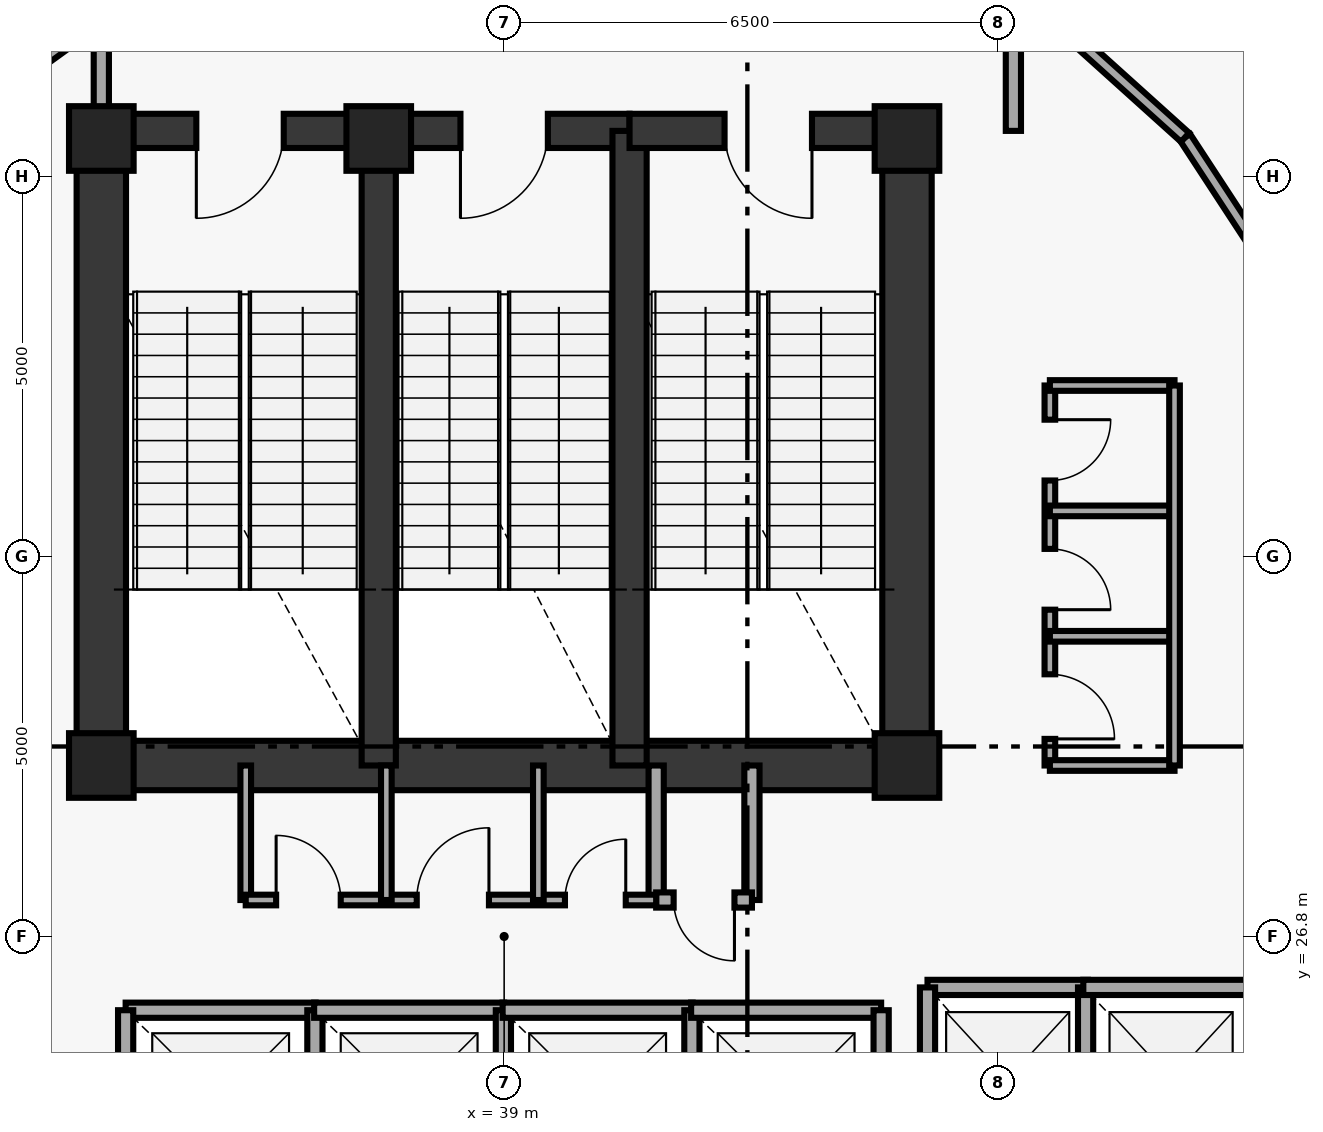
"""IFC4 building model, lengths in metres.
Left out: names, types, materials, properties, quantities, classifications, styles, units other than length and angle.
Written with IfcOpenShell. Run it as: python <this file> out.ifc"""

import sys

from ifc_helpers import new_model, si_unit, direction, frame, frame_2d, origin, origin_2d, place, context, subcontext, project, spatial, rectangle, extrude, element, fill, save


model = new_model("IFC4")
c1 = context("Model", 3, precision=1e-05, world=origin(), true_north=direction((0.0, 1.0)))
c2 = subcontext(c1, "Body", "Model", "MODEL_VIEW")
j1 = project(units=[si_unit("LENGTHUNIT", "METRE"), si_unit("PLANEANGLEUNIT", "RADIAN")], contexts=[c1])
p1 = place(None, origin())
s1 = spatial("IfcSite", under=j1, at=p1, CompositionType="ELEMENT")
p2 = place(p1, origin())
s2 = spatial("IfcBuilding", under=s1, at=p2, CompositionType="ELEMENT")
p3 = place(p2, frame((0.0, 0.0, 203.15)))
s3 = spatial("IfcBuildingStorey", under=s2, at=p3, CompositionType="ELEMENT", Elevation=203.15)
for number, where, z_axis, x_axis in (
    (1, (44.3, 29.05, 0.0), (0.0, 0.0, 1.0), (1.0, 0.0, 0.0)),
    (2, (44.3, 37.3, 0.0), (0.0, 0.0, 1.0), (1.0, 0.0, 0.0)),
    (3, (37.35, 37.3, 0.0), (0.0, 0.0, 1.0), (1.0, 0.0, 0.0)),
    (4, (33.7, 37.3, 0.0), (0.0, 0.0, 1.0), (1.0, 0.0, 0.0)),
    (5, (33.7, 29.05, 0.0), (0.0, 0.0, 1.0), (1.0, 0.0, 0.0)),
):
    element("IfcColumn", number, at=place(p3, frame(where, z_axis=z_axis, x_axis=x_axis)), inside=s3, PredefinedType="PILASTER", context=c2, shape_type="SweptSolid", body=[
        extrude(rectangle(XDim=0.85, YDim=0.85, at=origin_2d()), origin(), (0.0, 0.0, 1.0), 4.76),
    ])
for number, where, z_axis, x_axis in (
    (6, (33.7, 29.05, 0.0), (0.0, 0.0, 1.0), (0.0, 1.0, 0.0)),
    (7, (44.3, 29.05, 0.0), (0.0, 0.0, 1.0), (0.0, 1.0, 0.0)),
):
    element("IfcWall", number, at=place(p3, frame(where, z_axis=z_axis, x_axis=x_axis)), inside=s3, PredefinedType="SHEAR", context=c2, shape_type="SweptSolid", body=[
        extrude(rectangle(XDim=8.35, YDim=0.65, at=frame_2d((4.175, 0.0))), origin(), (0.0, 0.0, 1.0), 4.76),
    ])
p4 = place(p3, frame((33.7, 29.05, 0.0), z_axis=(0.0, 0.0, 1.0), x_axis=(1.0, 0.0, 0.0)))
e8 = element("IfcWall", 8, at=p4, inside=s3, PredefinedType="SHEAR", context=c2, shape_type="SweptSolid", body=[
    extrude(rectangle(XDim=10.6, YDim=0.65, at=frame_2d((5.3, 0.0))), origin(), (0.0, 0.0, 1.0), 4.76),
])
p5 = place(p3, frame((37.35, 37.4, 0.0), z_axis=(0.0, 0.0, 1.0), x_axis=(-1.0, 0.0, 0.0)))
e9 = element("IfcWall", 9, at=p5, inside=s3, PredefinedType="SHEAR", context=c2, shape_type="SweptSolid", body=[
    extrude(rectangle(XDim=3.65, YDim=0.45, at=frame_2d((1.825, 0.0))), origin(), (0.0, 0.0, 1.0), 4.76),
])
p6 = place(p5, frame((1.25, 0.0, 0.0)))
e10 = element("IfcOpeningElement", 10, at=p6, cuts=e9, PredefinedType="OPENING", context=c2, shape_type="SweptSolid", body=[
    extrude(rectangle(XDim=1.15, YDim=2.15, at=frame_2d((0.575, 1.075))), frame((0.0, 0.235, 0.0), z_axis=(0.0, -1.0, 0.0), x_axis=(1.0, 0.0, 0.0)), (0.0, 0.0, 1.0), 0.47),
])
p7 = place(p3, frame((37.35, 29.05, 0.0), z_axis=(0.0, 0.0, 1.0), x_axis=(0.0, 1.0, 0.0)))
e11 = element("IfcWall", 11, at=p7, inside=s3, PredefinedType="SHEAR", context=c2, shape_type="SweptSolid", body=[
    extrude(rectangle(XDim=8.35, YDim=0.45, at=frame_2d((4.175, 0.0))), origin(), (0.0, 0.0, 1.0), 4.76),
])
p8 = place(p3, frame((40.65, 37.4, 0.0), z_axis=(0.0, 0.0, 1.0), x_axis=(-1.0, 0.0, 0.0)))
e12 = element("IfcWall", 12, at=p8, inside=s3, PredefinedType="SHEAR", context=c2, shape_type="SweptSolid", body=[
    extrude(rectangle(XDim=3.3, YDim=0.45, at=frame_2d((1.65, 0.0))), origin(), (0.0, 0.0, 1.0), 4.76),
])
p9 = place(p8, frame((1.075, 0.0, 0.0)))
e13 = element("IfcOpeningElement", 13, at=p9, cuts=e12, PredefinedType="OPENING", context=c2, shape_type="SweptSolid", body=[
    extrude(rectangle(XDim=1.15, YDim=2.15, at=frame_2d((0.575, 1.075))), frame((0.0, 0.235, 0.0), z_axis=(0.0, -1.0, 0.0), x_axis=(1.0, 0.0, 0.0)), (0.0, 0.0, 1.0), 0.47),
])
p10 = place(p3, frame((40.65, 29.05, 0.0), z_axis=(0.0, 0.0, 1.0), x_axis=(0.0, 1.0, 0.0)))
e14 = element("IfcWall", 14, at=p10, inside=s3, PredefinedType="SHEAR", context=c2, shape_type="SweptSolid", body=[
    extrude(rectangle(XDim=8.35, YDim=0.45, at=frame_2d((4.175, 0.0))), origin(), (0.0, 0.0, 1.0), 4.76),
])
p11 = place(p3, frame((44.3, 37.4, 0.0), z_axis=(0.0, 0.0, 1.0), x_axis=(-1.0, 0.0, 0.0)))
e15 = element("IfcWall", 15, at=p11, inside=s3, PredefinedType="SHEAR", context=c2, shape_type="SweptSolid", body=[
    extrude(rectangle(XDim=3.65, YDim=0.45, at=frame_2d((1.825, 0.0))), origin(), (0.0, 0.0, 1.0), 4.76),
])
p12 = place(p11, frame((1.25, 0.0, 0.0)))
e16 = element("IfcOpeningElement", 16, at=p12, cuts=e15, PredefinedType="OPENING", context=c2, shape_type="SweptSolid", body=[
    extrude(rectangle(XDim=1.15, YDim=2.15, at=frame_2d((0.575, 1.075))), frame((0.0, 0.235, 0.0), z_axis=(0.0, -1.0, 0.0), x_axis=(1.0, 0.0, 0.0)), (0.0, 0.0, 1.0), 0.47),
])
for number, where, z_axis, x_axis in (
    (17, (33.7, 37.4, 0.0), (0.0, 0.0, 1.0), (0.0, 1.0, 0.0)),
    (18, (45.7, 37.4, 0.0), (0.0, 0.0, 1.0), (0.0, 1.0, 0.0)),
):
    element("IfcWall", number, at=place(p3, frame(where, z_axis=z_axis, x_axis=x_axis)), inside=s3, PredefinedType="SOLIDWALL", context=c2, shape_type="SweptSolid", body=[
        extrude(rectangle(XDim=1.88, YDim=0.2, at=frame_2d((0.94, 0.0))), origin(), (0.0, 0.0, 1.0), 4.76),
    ])
p13 = place(p3, frame((35.6, 27.28, 0.0), z_axis=(0.0, 0.0, 1.0), x_axis=(0.0, 1.0, 0.0)))
e19 = element("IfcWall", 19, at=p13, inside=s3, PredefinedType="PARTITIONING", context=c2, shape_type="SweptSolid", body=[
    extrude(rectangle(XDim=1.77, YDim=0.14, at=frame_2d((0.885, 0.0))), origin(), (0.0, 0.0, 1.0), 4.76),
])
for number, where, z_axis, x_axis in (
    (20, (41.0, 27.28, 0.0), (0.0, 0.0, 1.0), (0.0, 1.0, 0.0)),
    (21, (42.26, 27.28, 0.0), (0.0, 0.0, 1.0), (0.0, 1.0, 0.0)),
):
    element("IfcWall", number, at=place(p3, frame(where, z_axis=z_axis, x_axis=x_axis)), inside=s3, PredefinedType="SOLIDWALL", context=c2, shape_type="SweptSolid", body=[
        extrude(rectangle(XDim=1.77, YDim=0.2, at=frame_2d((0.885, 0.0))), origin(), (0.0, 0.0, 1.0), 4.76),
    ])
p14 = place(p3, frame((41.0, 27.28, 0.0), z_axis=(0.0, 0.0, 1.0), x_axis=(1.0, 0.0, 0.0)))
e22 = element("IfcWall", 22, at=p14, inside=s3, PredefinedType="SOLIDWALL", context=c2, shape_type="SweptSolid", body=[
    extrude(rectangle(XDim=1.26, YDim=0.2, at=frame_2d((0.63, 0.0))), origin(), (0.0, 0.0, 1.0), 4.76),
])
p15 = place(p14, frame((0.23, 0.0, 0.0)))
e23 = element("IfcOpeningElement", 23, at=p15, cuts=e22, PredefinedType="OPENING", context=c2, shape_type="SweptSolid", body=[
    extrude(rectangle(XDim=0.8, YDim=2.05, at=frame_2d((0.4, 1.025))), frame((0.0, 0.11, 0.0), z_axis=(0.0, -1.0, 0.0), x_axis=(1.0, 0.0, 0.0)), (0.0, 0.0, 1.0), 0.22),
])
p16 = place(p3, frame((44.57, 26.13, 0.0), z_axis=(0.0, 0.0, 1.0), x_axis=(1.0, 0.0, 0.0)))
e24 = element("IfcWall", 24, at=p16, inside=s3, PredefinedType="SOLIDWALL", context=c2, shape_type="SweptSolid", body=[
    extrude(rectangle(XDim=2.11, YDim=0.2, at=frame_2d((1.055, 0.0))), origin(), (0.0, 0.0, 1.0), 4.76),
])
for number, where, z_axis, x_axis in (
    (25, (44.57, 23.72, 0.0), (0.0, 0.0, 1.0), (0.0, 1.0, 0.0)),
    (26, (46.65, 23.72, 0.0), (0.0, 0.0, 1.0), (0.0, 1.0, 0.0)),
):
    element("IfcWall", number, at=place(p3, frame(where, z_axis=z_axis, x_axis=x_axis)), inside=s3, PredefinedType="SOLIDWALL", context=c2, shape_type="SweptSolid", body=[
        extrude(rectangle(XDim=2.41, YDim=0.2, at=frame_2d((1.205, 0.0))), origin(), (0.0, 0.0, 1.0), 4.76),
    ])
p17 = place(p3, frame((46.62, 26.13, 0.0), z_axis=(0.0, 0.0, 1.0), x_axis=(1.0, 0.0, 0.0)))
e27 = element("IfcWall", 27, at=p17, inside=s3, PredefinedType="SOLIDWALL", context=c2, shape_type="SweptSolid", body=[
    extrude(rectangle(XDim=2.31, YDim=0.2, at=frame_2d((1.155, 0.0))), origin(), (0.0, 0.0, 1.0), 4.76),
])
p18 = place(p3, frame((34.02, 25.83, 0.0), z_axis=(0.0, 0.0, 1.0), x_axis=(1.0, 0.0, 0.0)))
e28 = element("IfcWall", 28, at=p18, inside=s3, PredefinedType="SOLIDWALL", context=c2, shape_type="SweptSolid", body=[
    extrude(rectangle(XDim=2.5, YDim=0.2, at=frame_2d((1.25, 0.0))), origin(), (0.0, 0.0, 1.0), 4.76),
])
for number, where, z_axis, x_axis in (
    (29, (34.02, 23.42, 0.0), (0.0, 0.0, 1.0), (0.0, 1.0, 0.0)),
    (30, (36.51, 23.42, 0.0), (0.0, 0.0, 1.0), (0.0, 1.0, 0.0)),
):
    element("IfcWall", number, at=place(p3, frame(where, z_axis=z_axis, x_axis=x_axis)), inside=s3, PredefinedType="SOLIDWALL", context=c2, shape_type="SweptSolid", body=[
        extrude(rectangle(XDim=2.41, YDim=0.2, at=frame_2d((1.205, 0.0))), origin(), (0.0, 0.0, 1.0), 4.76),
    ])
p19 = place(p3, frame((36.5, 25.83, 0.0), z_axis=(0.0, 0.0, 1.0), x_axis=(1.0, 0.0, 0.0)))
e31 = element("IfcWall", 31, at=p19, inside=s3, PredefinedType="SOLIDWALL", context=c2, shape_type="SweptSolid", body=[
    extrude(rectangle(XDim=2.5, YDim=0.2, at=frame_2d((1.25, 0.0))), origin(), (0.0, 0.0, 1.0), 4.76),
])
p20 = place(p3, frame((38.99, 23.42, 0.0), z_axis=(0.0, 0.0, 1.0), x_axis=(0.0, 1.0, 0.0)))
e32 = element("IfcWall", 32, at=p20, inside=s3, PredefinedType="SOLIDWALL", context=c2, shape_type="SweptSolid", body=[
    extrude(rectangle(XDim=2.41, YDim=0.2, at=frame_2d((1.205, 0.0))), origin(), (0.0, 0.0, 1.0), 4.76),
])
p21 = place(p3, frame((38.98, 25.83, 0.0), z_axis=(0.0, 0.0, 1.0), x_axis=(1.0, 0.0, 0.0)))
e33 = element("IfcWall", 33, at=p21, inside=s3, PredefinedType="SOLIDWALL", context=c2, shape_type="SweptSolid", body=[
    extrude(rectangle(XDim=2.5, YDim=0.2, at=frame_2d((1.25, 0.0))), origin(), (0.0, 0.0, 1.0), 4.76),
])
p22 = place(p3, frame((41.47, 23.42, 0.0), z_axis=(0.0, 0.0, 1.0), x_axis=(0.0, 1.0, 0.0)))
e34 = element("IfcWall", 34, at=p22, inside=s3, PredefinedType="SOLIDWALL", context=c2, shape_type="SweptSolid", body=[
    extrude(rectangle(XDim=2.41, YDim=0.2, at=frame_2d((1.205, 0.0))), origin(), (0.0, 0.0, 1.0), 4.76),
])
p23 = place(p3, frame((41.46, 25.83, 0.0), z_axis=(0.0, 0.0, 1.0), x_axis=(1.0, 0.0, 0.0)))
e35 = element("IfcWall", 35, at=p23, inside=s3, PredefinedType="SOLIDWALL", context=c2, shape_type="SweptSolid", body=[
    extrude(rectangle(XDim=2.5, YDim=0.2, at=frame_2d((1.25, 0.0))), origin(), (0.0, 0.0, 1.0), 4.76),
])
p24 = place(p3, frame((43.96, 23.42, 0.0), z_axis=(0.0, 0.0, 1.0), x_axis=(0.0, 1.0, 0.0)))
e36 = element("IfcWall", 36, at=p24, inside=s3, PredefinedType="SOLIDWALL", context=c2, shape_type="SweptSolid", body=[
    extrude(rectangle(XDim=2.41, YDim=0.2, at=frame_2d((1.205, 0.0))), origin(), (0.0, 0.0, 1.0), 4.76),
])
p25 = place(p3, frame((35.6, 27.28, 0.0), z_axis=(0.0, 0.0, 1.0), x_axis=(1.0, 0.0, 0.0)))
e37 = element("IfcWall", 37, at=p25, inside=s3, PredefinedType="PARTITIONING", context=c2, shape_type="SweptSolid", body=[
    extrude(rectangle(XDim=5.4, YDim=0.14, at=frame_2d((2.7, 0.0))), origin(), (0.0, 0.0, 1.0), 4.76),
])
p26 = place(p25, frame((0.4, 0.0, 0.0)))
e38 = element("IfcOpeningElement", 38, at=p26, cuts=e37, PredefinedType="OPENING", context=c2, shape_type="SweptSolid", body=[
    extrude(rectangle(XDim=0.85, YDim=2.1, at=frame_2d((0.425, 1.05))), frame((0.0, 0.08, 0.0), z_axis=(0.0, -1.0, 0.0), x_axis=(1.0, 0.0, 0.0)), (0.0, 0.0, 1.0), 0.16),
])
p27 = place(p25, frame((2.25, 0.0, 0.0)))
e39 = element("IfcOpeningElement", 39, at=p27, cuts=e37, PredefinedType="OPENING", context=c2, shape_type="SweptSolid", body=[
    extrude(rectangle(XDim=0.95, YDim=2.1, at=frame_2d((0.475, 1.05))), frame((0.0, 0.08, 0.0), z_axis=(0.0, -1.0, 0.0), x_axis=(1.0, 0.0, 0.0)), (0.0, 0.0, 1.0), 0.16),
])
p28 = place(p25, frame((4.2, 0.0, 0.0)))
e40 = element("IfcOpeningElement", 40, at=p28, cuts=e37, PredefinedType="OPENING", context=c2, shape_type="SweptSolid", body=[
    extrude(rectangle(XDim=0.8, YDim=2.05, at=frame_2d((0.4, 1.025))), frame((0.0, 0.08, 0.0), z_axis=(0.0, -1.0, 0.0), x_axis=(1.0, 0.0, 0.0)), (0.0, 0.0, 1.0), 0.16),
])
for number, where, z_axis, x_axis in (
    (41, (37.45, 27.28, 0.0), (0.0, 0.0, 1.0), (0.0, 1.0, 0.0)),
    (42, (39.45, 27.28, 0.0), (0.0, 0.0, 1.0), (0.0, 1.0, 0.0)),
):
    element("IfcWall", number, at=place(p3, frame(where, z_axis=z_axis, x_axis=x_axis)), inside=s3, PredefinedType="PARTITIONING", context=c2, shape_type="SweptSolid", body=[
        extrude(rectangle(XDim=1.77, YDim=0.14, at=frame_2d((0.885, 0.0))), origin(), (0.0, 0.0, 1.0), 4.76),
    ])
p29 = place(p3, frame((46.18, 34.05, 0.0), z_axis=(0.0, 0.0, 1.0), x_axis=(0.0, -1.0, 0.0)))
e43 = element("IfcWall", 43, at=p29, inside=s3, PredefinedType="PARTITIONING", context=c2, shape_type="SweptSolid", body=[
    extrude(rectangle(XDim=5.0, YDim=0.14, at=frame_2d((2.5, 0.0))), origin(), (0.0, 0.0, 1.0), 4.76),
])
p30 = place(p29, frame((3.8, 0.0, 0.0)))
e44 = element("IfcOpeningElement", 44, at=p30, cuts=e43, PredefinedType="OPENING", context=c2, shape_type="SweptSolid", body=[
    extrude(rectangle(XDim=0.85, YDim=2.1, at=frame_2d((0.425, 1.05))), frame((0.0, 0.08, 0.0), z_axis=(0.0, -1.0, 0.0), x_axis=(1.0, 0.0, 0.0)), (0.0, 0.0, 1.0), 0.16),
])
p31 = place(p29, frame((2.15, 0.0, 0.0)))
e45 = element("IfcOpeningElement", 45, at=p31, cuts=e43, PredefinedType="OPENING", context=c2, shape_type="SweptSolid", body=[
    extrude(rectangle(XDim=0.8, YDim=2.05, at=frame_2d((0.4, 1.025))), frame((0.0, 0.08, 0.0), z_axis=(0.0, -1.0, 0.0), x_axis=(1.0, 0.0, 0.0)), (0.0, 0.0, 1.0), 0.16),
])
p32 = place(p29, frame((0.45, 0.0, 0.0)))
e46 = element("IfcOpeningElement", 46, at=p32, cuts=e43, PredefinedType="OPENING", context=c2, shape_type="SweptSolid", body=[
    extrude(rectangle(XDim=0.8, YDim=2.05, at=frame_2d((0.4, 1.025))), frame((0.0, 0.08, 0.0), z_axis=(0.0, -1.0, 0.0), x_axis=(1.0, 0.0, 0.0)), (0.0, 0.0, 1.0), 0.16),
])
for number, where, z_axis, x_axis in (
    (47, (46.18, 29.05, 0.0), (0.0, 0.0, 1.0), (1.0, 0.0, 0.0)),
    (48, (46.18, 30.75, 0.0), (0.0, 0.0, 1.0), (1.0, 0.0, 0.0)),
    (49, (46.18, 32.4, 0.0), (0.0, 0.0, 1.0), (1.0, 0.0, 0.0)),
    (50, (46.18, 34.05, 0.0), (0.0, 0.0, 1.0), (1.0, 0.0, 0.0)),
):
    element("IfcWall", number, at=place(p3, frame(where, z_axis=z_axis, x_axis=x_axis)), inside=s3, PredefinedType="PARTITIONING", context=c2, shape_type="SweptSolid", body=[
        extrude(rectangle(XDim=1.64, YDim=0.14, at=frame_2d((0.82, 0.0))), origin(), (0.0, 0.0, 1.0), 4.76),
    ])
p33 = place(p3, frame((47.82, 29.05, 0.0), z_axis=(0.0, 0.0, 1.0), x_axis=(0.0, 1.0, 0.0)))
e51 = element("IfcWall", 51, at=p33, inside=s3, PredefinedType="PARTITIONING", context=c2, shape_type="SweptSolid", body=[
    extrude(rectangle(XDim=5.0, YDim=0.14, at=frame_2d((2.5, 0.0))), origin(), (0.0, 0.0, 1.0), 4.76),
])
p34 = place(p3, frame((49.973, 34.235, 0.0), z_axis=(0.0, 0.0, 1.0), x_axis=(-0.547283325884, 0.836947406477, 0.0)))
e52 = element("IfcWall", 52, at=p34, inside=s3, PredefinedType="PARTITIONING", context=c2, shape_type="SweptSolid", body=[
    extrude(rectangle(XDim=3.68, YDim=0.16, at=frame_2d((1.84, 0.0))), origin(), (0.0, 0.0, 1.0), 4.76),
])
p35 = place(p3, frame((47.959, 37.315, 0.0), z_axis=(0.0, 0.0, 1.0), x_axis=(-0.743094720901, 0.669186248939, 0.0)))
e53 = element("IfcWall", 53, at=p35, inside=s3, PredefinedType="PARTITIONING", context=c2, shape_type="SweptSolid", body=[
    extrude(rectangle(XDim=3.531, YDim=0.16, at=frame_2d((1.766, 0.0))), origin(), (0.0, 0.0, 1.0), 4.76),
])
p36 = place(p3, frame((36.049, 40.593, 0.0), z_axis=(0.0, 0.0, 1.0), x_axis=(-0.810271736342, -0.58605436035, 0.0)))
e54 = element("IfcWall", 54, at=p36, inside=s3, PredefinedType="PARTITIONING", context=c2, shape_type="SweptSolid", body=[
    extrude(rectangle(XDim=6.307, YDim=0.16, at=frame_2d((3.153, 0.0))), origin(), (0.0, 0.0, 1.0), 4.76),
])
p37 = place(p6, origin())
e55 = element("IfcDoor", 55, at=p37, inside=s3, OperationType="SINGLE_SWING_RIGHT", PredefinedType="DOOR", context=c2, shape_type="SweptSolid", body=[
    extrude(rectangle(XDim=1.15, YDim=2.15, at=frame_2d((0.575, 1.075))), frame((0.0, 0.025, 0.0), z_axis=(0.0, -1.0, 0.0), x_axis=(1.0, 0.0, 0.0)), (0.0, 0.0, 1.0), 0.05),
])
fill(e10, e55)
p38 = place(p9, origin())
e56 = element("IfcDoor", 56, at=p38, inside=s3, OperationType="SINGLE_SWING_RIGHT", PredefinedType="DOOR", context=c2, shape_type="SweptSolid", body=[
    extrude(rectangle(XDim=1.15, YDim=2.15, at=frame_2d((0.575, 1.075))), frame((0.0, 0.025, 0.0), z_axis=(0.0, -1.0, 0.0), x_axis=(1.0, 0.0, 0.0)), (0.0, 0.0, 1.0), 0.05),
])
fill(e13, e56)
p39 = place(p12, origin())
e57 = element("IfcDoor", 57, at=p39, inside=s3, OperationType="SINGLE_SWING_LEFT", PredefinedType="DOOR", context=c2, shape_type="SweptSolid", body=[
    extrude(rectangle(XDim=1.15, YDim=2.15, at=frame_2d((0.575, 1.075))), frame((0.0, 0.025, 0.0), z_axis=(0.0, -1.0, 0.0), x_axis=(1.0, 0.0, 0.0)), (0.0, 0.0, 1.0), 0.05),
])
fill(e16, e57)
p40 = place(p15, origin())
e58 = element("IfcDoor", 58, at=p40, inside=s3, OperationType="SINGLE_SWING_RIGHT", PredefinedType="DOOR", context=c2, shape_type="SweptSolid", body=[
    extrude(rectangle(XDim=0.8, YDim=2.05, at=frame_2d((0.4, 1.025))), frame((0.0, 0.025, 0.0), z_axis=(0.0, -1.0, 0.0), x_axis=(1.0, 0.0, 0.0)), (0.0, 0.0, 1.0), 0.05),
])
fill(e23, e58)
p41 = place(p26, origin())
e59 = element("IfcDoor", 59, at=p41, inside=s3, OperationType="SINGLE_SWING_LEFT", PredefinedType="DOOR", context=c2, shape_type="SweptSolid", body=[
    extrude(rectangle(XDim=0.85, YDim=2.1, at=frame_2d((0.425, 1.05))), frame((0.0, 0.025, 0.0), z_axis=(0.0, -1.0, 0.0), x_axis=(1.0, 0.0, 0.0)), (0.0, 0.0, 1.0), 0.05),
])
fill(e38, e59)
p42 = place(p27, origin())
e60 = element("IfcDoor", 60, at=p42, inside=s3, OperationType="SINGLE_SWING_RIGHT", PredefinedType="DOOR", context=c2, shape_type="SweptSolid", body=[
    extrude(rectangle(XDim=0.95, YDim=2.1, at=frame_2d((0.475, 1.05))), frame((0.0, 0.025, 0.0), z_axis=(0.0, -1.0, 0.0), x_axis=(1.0, 0.0, 0.0)), (0.0, 0.0, 1.0), 0.05),
])
fill(e39, e60)
p43 = place(p28, origin())
e61 = element("IfcDoor", 61, at=p43, inside=s3, OperationType="SINGLE_SWING_RIGHT", PredefinedType="DOOR", context=c2, shape_type="SweptSolid", body=[
    extrude(rectangle(XDim=0.8, YDim=2.05, at=frame_2d((0.4, 1.025))), frame((0.0, 0.025, 0.0), z_axis=(0.0, -1.0, 0.0), x_axis=(1.0, 0.0, 0.0)), (0.0, 0.0, 1.0), 0.05),
])
fill(e40, e61)
p44 = place(p30, origin())
e62 = element("IfcDoor", 62, at=p44, inside=s3, OperationType="SINGLE_SWING_RIGHT", PredefinedType="DOOR", context=c2, shape_type="SweptSolid", body=[
    extrude(rectangle(XDim=0.85, YDim=2.1, at=frame_2d((0.425, 1.05))), frame((0.0, 0.025, 0.0), z_axis=(0.0, -1.0, 0.0), x_axis=(1.0, 0.0, 0.0)), (0.0, 0.0, 1.0), 0.05),
])
fill(e44, e62)
p45 = place(p31, origin())
e63 = element("IfcDoor", 63, at=p45, inside=s3, OperationType="SINGLE_SWING_RIGHT", PredefinedType="DOOR", context=c2, shape_type="SweptSolid", body=[
    extrude(rectangle(XDim=0.8, YDim=2.05, at=frame_2d((0.4, 1.025))), frame((0.0, 0.025, 0.0), z_axis=(0.0, -1.0, 0.0), x_axis=(1.0, 0.0, 0.0)), (0.0, 0.0, 1.0), 0.05),
])
fill(e45, e63)
p46 = place(p32, origin())
e64 = element("IfcDoor", 64, at=p46, inside=s3, OperationType="SINGLE_SWING_LEFT", PredefinedType="DOOR", context=c2, shape_type="SweptSolid", body=[
    extrude(rectangle(XDim=0.8, YDim=2.05, at=frame_2d((0.4, 1.025))), frame((0.0, 0.025, 0.0), z_axis=(0.0, -1.0, 0.0), x_axis=(1.0, 0.0, 0.0)), (0.0, 0.0, 1.0), 0.05),
])
fill(e46, e64)
save(model, sys.argv[1])
